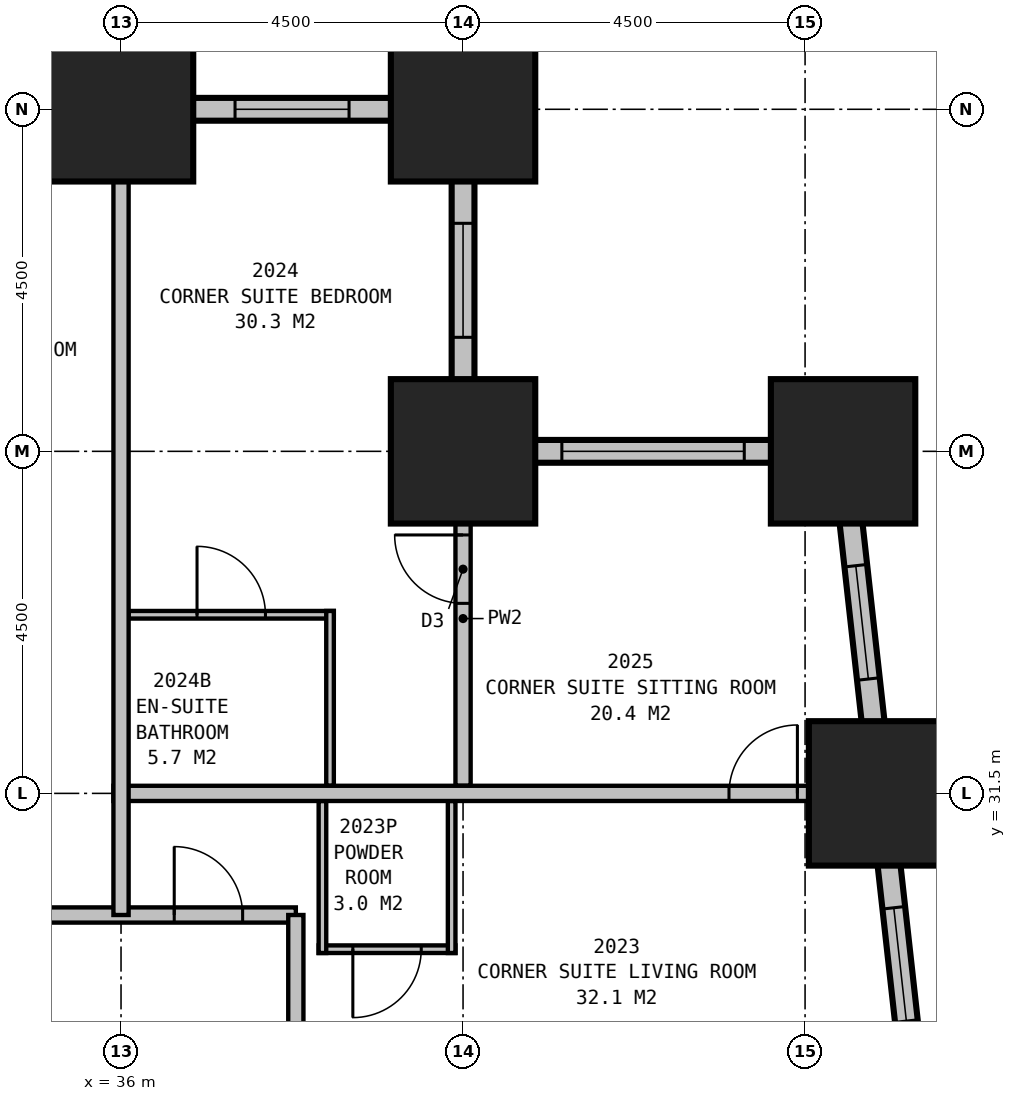
"""IFC4 building model, lengths in metres.
Left out: names, types, materials, properties, quantities, classifications, styles, units other than length and angle.
Written with IfcOpenShell. Run it as: python <this file> out.ifc"""

import sys

from ifc_helpers import new_model, si_unit, direction, frame, frame_2d, origin, origin_2d, place, context, subcontext, project, spatial, rectangle, extrude, element, fill, save


model = new_model("IFC4")
c1 = context("Model", 3, precision=1e-05, world=origin(), true_north=direction((0.0, 1.0)))
c2 = subcontext(c1, "Body", "Model", "MODEL_VIEW")
j1 = project(units=[si_unit("LENGTHUNIT", "METRE"), si_unit("PLANEANGLEUNIT", "RADIAN")], contexts=[c1])
p1 = place(None, origin())
s1 = spatial("IfcSite", under=j1, at=p1, CompositionType="ELEMENT")
p2 = place(p1, origin())
s2 = spatial("IfcBuilding", under=s1, at=p2, CompositionType="ELEMENT")
p3 = place(p2, frame((0.0, 0.0, 82.2)))
s3 = spatial("IfcBuildingStorey", under=s2, at=p3, CompositionType="ELEMENT", Elevation=82.2)
for number, where, z_axis, x_axis in (
    (1, (46.0, 31.5, 0.0), (0.0, 0.0, 1.0), (1.0, 0.0, 0.0)),
    (2, (45.5, 36.0, 0.0), (0.0, 0.0, 1.0), (1.0, 0.0, 0.0)),
    (3, (40.5, 36.0, 0.0), (0.0, 0.0, 1.0), (1.0, 0.0, 0.0)),
    (4, (40.5, 40.5, 0.0), (0.0, 0.0, 1.0), (1.0, 0.0, 0.0)),
    (5, (36.0, 40.5, 0.0), (0.0, 0.0, 1.0), (1.0, 0.0, 0.0)),
):
    element("IfcColumn", number, at=place(p3, frame(where, z_axis=z_axis, x_axis=x_axis)), inside=s3, PredefinedType="COLUMN", context=c2, shape_type="SweptSolid", body=[
        extrude(rectangle(XDim=1.9, YDim=1.9, at=origin_2d()), origin(), (0.0, 0.0, 1.0), 3.5),
    ])
p4 = place(p3, frame((49.017, 4.351, 0.0), z_axis=(0.0, 0.0, 1.0), x_axis=(-0.110433201132, 0.993883548555, 0.0)))
e6 = element("IfcWall", 6, at=p4, inside=s3, PredefinedType="STANDARD", context=c2, shape_type="SweptSolid", body=[
    extrude(rectangle(XDim=31.994, YDim=0.3, at=frame_2d((15.997, 0.0))), origin(), (0.0, 0.0, 1.0), 2.1),
])
p5 = place(p4, frame((1.664, 0.0, 0.5)))
e7 = element("IfcOpeningElement", 7, at=p5, cuts=e6, PredefinedType="OPENING", context=c2, shape_type="SweptSolid", body=[
    extrude(rectangle(XDim=1.5, YDim=1.4, at=frame_2d((0.75, 0.7))), frame((0.0, 0.16, 0.0), z_axis=(0.0, -1.0, 0.0), x_axis=(1.0, 0.0, 0.0)), (0.0, 0.0, 1.0), 0.32),
])
p6 = place(p4, frame((6.192, 0.0, 0.5)))
e8 = element("IfcOpeningElement", 8, at=p6, cuts=e6, PredefinedType="OPENING", context=c2, shape_type="SweptSolid", body=[
    extrude(rectangle(XDim=1.5, YDim=1.4, at=frame_2d((0.75, 0.7))), frame((0.0, 0.16, 0.0), z_axis=(0.0, -1.0, 0.0), x_axis=(1.0, 0.0, 0.0)), (0.0, 0.0, 1.0), 0.32),
])
p7 = place(p4, frame((10.719, 0.0, 0.5)))
e9 = element("IfcOpeningElement", 9, at=p7, cuts=e6, PredefinedType="OPENING", context=c2, shape_type="SweptSolid", body=[
    extrude(rectangle(XDim=1.5, YDim=1.4, at=frame_2d((0.75, 0.7))), frame((0.0, 0.16, 0.0), z_axis=(0.0, -1.0, 0.0), x_axis=(1.0, 0.0, 0.0)), (0.0, 0.0, 1.0), 0.32),
])
p8 = place(p4, frame((15.247, 0.0, 0.5)))
e10 = element("IfcOpeningElement", 10, at=p8, cuts=e6, PredefinedType="OPENING", context=c2, shape_type="SweptSolid", body=[
    extrude(rectangle(XDim=1.5, YDim=1.4, at=frame_2d((0.75, 0.7))), frame((0.0, 0.16, 0.0), z_axis=(0.0, -1.0, 0.0), x_axis=(1.0, 0.0, 0.0)), (0.0, 0.0, 1.0), 0.32),
])
p9 = place(p4, frame((19.775, 0.0, 0.5)))
e11 = element("IfcOpeningElement", 11, at=p9, cuts=e6, PredefinedType="OPENING", context=c2, shape_type="SweptSolid", body=[
    extrude(rectangle(XDim=1.5, YDim=1.4, at=frame_2d((0.75, 0.7))), frame((0.0, 0.16, 0.0), z_axis=(0.0, -1.0, 0.0), x_axis=(1.0, 0.0, 0.0)), (0.0, 0.0, 1.0), 0.32),
])
p10 = place(p4, frame((24.302, 0.0, 0.5)))
e12 = element("IfcOpeningElement", 12, at=p10, cuts=e6, PredefinedType="OPENING", context=c2, shape_type="SweptSolid", body=[
    extrude(rectangle(XDim=1.5, YDim=1.4, at=frame_2d((0.75, 0.7))), frame((0.0, 0.16, 0.0), z_axis=(0.0, -1.0, 0.0), x_axis=(1.0, 0.0, 0.0)), (0.0, 0.0, 1.0), 0.32),
])
p11 = place(p4, frame((28.83, 0.0, 0.5)))
e13 = element("IfcOpeningElement", 13, at=p11, cuts=e6, PredefinedType="OPENING", context=c2, shape_type="SweptSolid", body=[
    extrude(rectangle(XDim=1.5, YDim=1.4, at=frame_2d((0.75, 0.7))), frame((0.0, 0.16, 0.0), z_axis=(0.0, -1.0, 0.0), x_axis=(1.0, 0.0, 0.0)), (0.0, 0.0, 1.0), 0.32),
])
p12 = place(p3, frame((45.65, 36.0, 0.0), z_axis=(0.0, 0.0, 1.0), x_axis=(-1.0, 0.0, 0.0)))
e14 = element("IfcWall", 14, at=p12, inside=s3, PredefinedType="STANDARD", context=c2, shape_type="SweptSolid", body=[
    extrude(rectangle(XDim=5.3, YDim=0.3, at=frame_2d((2.65, 0.0))), origin(), (0.0, 0.0, 1.0), 2.1),
])
p13 = place(p12, frame((1.45, 0.0, 0.5)))
e15 = element("IfcOpeningElement", 15, at=p13, cuts=e14, PredefinedType="OPENING", context=c2, shape_type="SweptSolid", body=[
    extrude(rectangle(XDim=2.4, YDim=1.4, at=frame_2d((1.2, 0.7))), frame((0.0, 0.16, 0.0), z_axis=(0.0, -1.0, 0.0), x_axis=(1.0, 0.0, 0.0)), (0.0, 0.0, 1.0), 0.32),
])
p14 = place(p3, frame((40.5, 35.85, 0.0), z_axis=(0.0, 0.0, 1.0), x_axis=(0.0, 1.0, 0.0)))
e16 = element("IfcWall", 16, at=p14, inside=s3, PredefinedType="STANDARD", context=c2, shape_type="SweptSolid", body=[
    extrude(rectangle(XDim=4.8, YDim=0.3, at=frame_2d((2.4, 0.0))), origin(), (0.0, 0.0, 1.0), 2.1),
])
p15 = place(p14, frame((1.65, 0.0, 0.5)))
e17 = element("IfcOpeningElement", 17, at=p15, cuts=e16, PredefinedType="OPENING", context=c2, shape_type="SweptSolid", body=[
    extrude(rectangle(XDim=1.5, YDim=1.4, at=frame_2d((0.75, 0.7))), frame((0.0, 0.16, 0.0), z_axis=(0.0, -1.0, 0.0), x_axis=(1.0, 0.0, 0.0)), (0.0, 0.0, 1.0), 0.32),
])
p16 = place(p3, frame((40.65, 40.5, 0.0), z_axis=(0.0, 0.0, 1.0), x_axis=(-1.0, 0.0, 0.0)))
e18 = element("IfcWall", 18, at=p16, inside=s3, PredefinedType="STANDARD", context=c2, shape_type="SweptSolid", body=[
    extrude(rectangle(XDim=31.8, YDim=0.3, at=frame_2d((15.9, 0.0))), origin(), (0.0, 0.0, 1.0), 2.1),
])
p17 = place(p16, frame((1.65, 0.0, 0.5)))
e19 = element("IfcOpeningElement", 19, at=p17, cuts=e18, PredefinedType="OPENING", context=c2, shape_type="SweptSolid", body=[
    extrude(rectangle(XDim=1.5, YDim=1.4, at=frame_2d((0.75, 0.7))), frame((0.0, 0.16, 0.0), z_axis=(0.0, -1.0, 0.0), x_axis=(1.0, 0.0, 0.0)), (0.0, 0.0, 1.0), 0.32),
])
p18 = place(p16, frame((6.15, 0.0, 0.5)))
e20 = element("IfcOpeningElement", 20, at=p18, cuts=e18, PredefinedType="OPENING", context=c2, shape_type="SweptSolid", body=[
    extrude(rectangle(XDim=1.5, YDim=1.4, at=frame_2d((0.75, 0.7))), frame((0.0, 0.16, 0.0), z_axis=(0.0, -1.0, 0.0), x_axis=(1.0, 0.0, 0.0)), (0.0, 0.0, 1.0), 0.32),
])
p19 = place(p16, frame((10.65, 0.0, 0.5)))
e21 = element("IfcOpeningElement", 21, at=p19, cuts=e18, PredefinedType="OPENING", context=c2, shape_type="SweptSolid", body=[
    extrude(rectangle(XDim=1.5, YDim=1.4, at=frame_2d((0.75, 0.7))), frame((0.0, 0.16, 0.0), z_axis=(0.0, -1.0, 0.0), x_axis=(1.0, 0.0, 0.0)), (0.0, 0.0, 1.0), 0.32),
])
p20 = place(p16, frame((15.15, 0.0, 0.5)))
e22 = element("IfcOpeningElement", 22, at=p20, cuts=e18, PredefinedType="OPENING", context=c2, shape_type="SweptSolid", body=[
    extrude(rectangle(XDim=1.5, YDim=1.4, at=frame_2d((0.75, 0.7))), frame((0.0, 0.16, 0.0), z_axis=(0.0, -1.0, 0.0), x_axis=(1.0, 0.0, 0.0)), (0.0, 0.0, 1.0), 0.32),
])
p21 = place(p16, frame((19.65, 0.0, 0.5)))
e23 = element("IfcOpeningElement", 23, at=p21, cuts=e18, PredefinedType="OPENING", context=c2, shape_type="SweptSolid", body=[
    extrude(rectangle(XDim=1.5, YDim=1.4, at=frame_2d((0.75, 0.7))), frame((0.0, 0.16, 0.0), z_axis=(0.0, -1.0, 0.0), x_axis=(1.0, 0.0, 0.0)), (0.0, 0.0, 1.0), 0.32),
])
p22 = place(p16, frame((24.15, 0.0, 0.5)))
e24 = element("IfcOpeningElement", 24, at=p22, cuts=e18, PredefinedType="OPENING", context=c2, shape_type="SweptSolid", body=[
    extrude(rectangle(XDim=1.5, YDim=1.4, at=frame_2d((0.75, 0.7))), frame((0.0, 0.16, 0.0), z_axis=(0.0, -1.0, 0.0), x_axis=(1.0, 0.0, 0.0)), (0.0, 0.0, 1.0), 0.32),
])
p23 = place(p16, frame((28.65, 0.0, 0.5)))
e25 = element("IfcOpeningElement", 25, at=p23, cuts=e18, PredefinedType="OPENING", context=c2, shape_type="SweptSolid", body=[
    extrude(rectangle(XDim=1.5, YDim=1.4, at=frame_2d((0.75, 0.7))), frame((0.0, 0.16, 0.0), z_axis=(0.0, -1.0, 0.0), x_axis=(1.0, 0.0, 0.0)), (0.0, 0.0, 1.0), 0.32),
])
p24 = place(p3, frame((11.2, 29.9, 0.0), z_axis=(0.0, 0.0, 1.0), x_axis=(1.0, 0.0, 0.0)))
e26 = element("IfcWall", 26, at=p24, inside=s3, PredefinedType="PARTITIONING", context=c2, shape_type="SweptSolid", body=[
    extrude(rectangle(XDim=27.1, YDim=0.2, at=frame_2d((13.55, 0.0))), origin(), (0.0, 0.0, 1.0), 3.25),
])
p25 = place(p24, frame((5.05, 0.0, 0.0)))
e27 = element("IfcOpeningElement", 27, at=p25, cuts=e26, PredefinedType="OPENING", context=c2, shape_type="SweptSolid", body=[
    extrude(rectangle(XDim=0.9, YDim=2.1, at=frame_2d((0.45, 1.05))), frame((0.0, 0.11, 0.0), z_axis=(0.0, -1.0, 0.0), x_axis=(1.0, 0.0, 0.0)), (0.0, 0.0, 1.0), 0.22),
])
p26 = place(p24, frame((7.65, 0.0, 0.0)))
e28 = element("IfcOpeningElement", 28, at=p26, cuts=e26, PredefinedType="OPENING", context=c2, shape_type="SweptSolid", body=[
    extrude(rectangle(XDim=0.9, YDim=2.1, at=frame_2d((0.45, 1.05))), frame((0.0, 0.11, 0.0), z_axis=(0.0, -1.0, 0.0), x_axis=(1.0, 0.0, 0.0)), (0.0, 0.0, 1.0), 0.22),
])
p27 = place(p24, frame((12.0, 0.0, 0.0)))
e29 = element("IfcOpeningElement", 29, at=p27, cuts=e26, PredefinedType="OPENING", context=c2, shape_type="SweptSolid", body=[
    extrude(rectangle(XDim=1.0, YDim=2.1, at=frame_2d((0.5, 1.05))), frame((0.0, 0.11, 0.0), z_axis=(0.0, -1.0, 0.0), x_axis=(1.0, 0.0, 0.0)), (0.0, 0.0, 1.0), 0.22),
])
p28 = place(p24, frame((17.45, 0.0, 0.0)))
e30 = element("IfcOpeningElement", 30, at=p28, cuts=e26, PredefinedType="OPENING", context=c2, shape_type="SweptSolid", body=[
    extrude(rectangle(XDim=0.9, YDim=2.1, at=frame_2d((0.45, 1.05))), frame((0.0, 0.11, 0.0), z_axis=(0.0, -1.0, 0.0), x_axis=(1.0, 0.0, 0.0)), (0.0, 0.0, 1.0), 0.22),
])
p29 = place(p24, frame((21.8, 0.0, 0.0)))
e31 = element("IfcOpeningElement", 31, at=p29, cuts=e26, PredefinedType="OPENING", context=c2, shape_type="SweptSolid", body=[
    extrude(rectangle(XDim=0.9, YDim=2.1, at=frame_2d((0.45, 1.05))), frame((0.0, 0.11, 0.0), z_axis=(0.0, -1.0, 0.0), x_axis=(1.0, 0.0, 0.0)), (0.0, 0.0, 1.0), 0.22),
])
p30 = place(p24, frame((25.5, 0.0, 0.0)))
e32 = element("IfcOpeningElement", 32, at=p30, cuts=e26, PredefinedType="OPENING", context=c2, shape_type="SweptSolid", body=[
    extrude(rectangle(XDim=0.9, YDim=2.1, at=frame_2d((0.45, 1.05))), frame((0.0, 0.11, 0.0), z_axis=(0.0, -1.0, 0.0), x_axis=(1.0, 0.0, 0.0)), (0.0, 0.0, 1.0), 0.22),
])
p31 = place(p24, frame((0.7, 0.0, 0.0)))
e33 = element("IfcOpeningElement", 33, at=p31, cuts=e26, PredefinedType="OPENING", context=c2, shape_type="SweptSolid", body=[
    extrude(rectangle(XDim=0.9, YDim=2.1, at=frame_2d((0.45, 1.05))), frame((0.0, 0.11, 0.0), z_axis=(0.0, -1.0, 0.0), x_axis=(1.0, 0.0, 0.0)), (0.0, 0.0, 1.0), 0.22),
])
p32 = place(p3, frame((38.3, 11.2, 0.0), z_axis=(0.0, 0.0, 1.0), x_axis=(0.0, 1.0, 0.0)))
e34 = element("IfcWall", 34, at=p32, inside=s3, PredefinedType="PARTITIONING", context=c2, shape_type="SweptSolid", body=[
    extrude(rectangle(XDim=18.7, YDim=0.2, at=frame_2d((9.35, 0.0))), origin(), (0.0, 0.0, 1.0), 3.25),
])
p33 = place(p32, frame((6.45, 0.0, 0.0), z_axis=(0.0, 0.0, 1.0), x_axis=(-1.0, 0.0, 0.0)))
e35 = element("IfcOpeningElement", 35, at=p33, cuts=e34, PredefinedType="OPENING", context=c2, shape_type="SweptSolid", body=[
    extrude(rectangle(XDim=1.0, YDim=2.1, at=frame_2d((0.5, 1.05))), frame((0.0, 0.11, 0.0), z_axis=(0.0, -1.0, 0.0), x_axis=(1.0, 0.0, 0.0)), (0.0, 0.0, 1.0), 0.22),
])
p34 = place(p32, frame((8.0, 0.0, 0.0), z_axis=(0.0, 0.0, 1.0), x_axis=(-1.0, 0.0, 0.0)))
e36 = element("IfcOpeningElement", 36, at=p34, cuts=e34, PredefinedType="OPENING", context=c2, shape_type="SweptSolid", body=[
    extrude(rectangle(XDim=0.9, YDim=2.1, at=frame_2d((0.45, 1.05))), frame((0.0, 0.11, 0.0), z_axis=(0.0, -1.0, 0.0), x_axis=(1.0, 0.0, 0.0)), (0.0, 0.0, 1.0), 0.22),
])
p35 = place(p3, frame((36.0, 29.9, 0.0), z_axis=(0.0, 0.0, 1.0), x_axis=(0.0, 1.0, 0.0)))
e37 = element("IfcWall", 37, at=p35, inside=s3, PredefinedType="PARTITIONING", context=c2, shape_type="SweptSolid", body=[
    extrude(rectangle(XDim=10.6, YDim=0.2, at=frame_2d((5.3, 0.0))), origin(), (0.0, 0.0, 1.0), 2.2),
])
p36 = place(p3, frame((35.9, 31.5, 0.0), z_axis=(0.0, 0.0, 1.0), x_axis=(1.0, 0.0, 0.0)))
e38 = element("IfcWall", 38, at=p36, inside=s3, PredefinedType="PARTITIONING", context=c2, shape_type="SweptSolid", body=[
    extrude(rectangle(XDim=10.099, YDim=0.2, at=frame_2d((5.05, 0.0))), origin(), (0.0, 0.0, 1.0), 3.25),
])
p37 = place(p36, frame((8.099, 0.0, 0.0)))
e39 = element("IfcOpeningElement", 39, at=p37, cuts=e38, PredefinedType="OPENING", context=c2, shape_type="SweptSolid", body=[
    extrude(rectangle(XDim=0.9, YDim=2.1, at=frame_2d((0.45, 1.05))), frame((0.0, 0.11, 0.0), z_axis=(0.0, -1.0, 0.0), x_axis=(1.0, 0.0, 0.0)), (0.0, 0.0, 1.0), 0.22),
])
p38 = place(p3, frame((40.35, 31.4, 0.0), z_axis=(0.0, 0.0, 1.0), x_axis=(0.0, -1.0, 0.0)))
e40 = element("IfcWall", 40, at=p38, inside=s3, PredefinedType="PLUMBINGWALL", context=c2, shape_type="SweptSolid", body=[
    extrude(rectangle(XDim=2.0, YDim=0.1, at=frame_2d((1.0, 0.0))), origin(), (0.0, 0.0, 1.0), 2.2),
])
p39 = place(p3, frame((38.65, 31.4, 0.0), z_axis=(0.0, 0.0, 1.0), x_axis=(0.0, -1.0, 0.0)))
e41 = element("IfcWall", 41, at=p39, inside=s3, PredefinedType="PLUMBINGWALL", context=c2, shape_type="SweptSolid", body=[
    extrude(rectangle(XDim=2.0, YDim=0.1, at=frame_2d((1.0, 0.0))), origin(), (0.0, 0.0, 1.0), 3.25),
])
p40 = place(p3, frame((38.6, 29.45, 0.0), z_axis=(0.0, 0.0, 1.0), x_axis=(1.0, 0.0, 0.0)))
e42 = element("IfcWall", 42, at=p40, inside=s3, PredefinedType="PLUMBINGWALL", context=c2, shape_type="SweptSolid", body=[
    extrude(rectangle(XDim=1.8, YDim=0.1, at=frame_2d((0.9, 0.0))), origin(), (0.0, 0.0, 1.0), 3.25),
])
p41 = place(p40, frame((1.35, 0.0, 0.0), z_axis=(0.0, 0.0, 1.0), x_axis=(-1.0, 0.0, 0.0)))
e43 = element("IfcOpeningElement", 43, at=p41, cuts=e42, PredefinedType="OPENING", context=c2, shape_type="SweptSolid", body=[
    extrude(rectangle(XDim=0.9, YDim=2.1, at=frame_2d((0.45, 1.05))), frame((0.0, 0.06, 0.0), z_axis=(0.0, -1.0, 0.0), x_axis=(1.0, 0.0, 0.0)), (0.0, 0.0, 1.0), 0.12),
])
p42 = place(p3, frame((40.5, 31.6, 0.0), z_axis=(0.0, 0.0, 1.0), x_axis=(0.0, 1.0, 0.0)))
e44 = element("IfcWall", 44, at=p42, inside=s3, PredefinedType="PARTITIONING", context=c2, shape_type="SweptSolid", body=[
    extrude(rectangle(XDim=4.4, YDim=0.2, at=frame_2d((2.2, 0.0))), origin(), (0.0, 0.0, 1.0), 2.2),
])
p43 = place(p42, frame((2.4, 0.0, 0.0)))
e45 = element("IfcOpeningElement", 45, at=p43, cuts=e44, PredefinedType="OPENING", context=c2, shape_type="SweptSolid", body=[
    extrude(rectangle(XDim=0.9, YDim=2.1, at=frame_2d((0.45, 1.05))), frame((0.0, 0.11, 0.0), z_axis=(0.0, -1.0, 0.0), x_axis=(1.0, 0.0, 0.0)), (0.0, 0.0, 1.0), 0.22),
])
p44 = place(p3, frame((38.75, 31.6, 0.0), z_axis=(0.0, 0.0, 1.0), x_axis=(0.0, 1.0, 0.0)))
e46 = element("IfcWall", 46, at=p44, inside=s3, PredefinedType="PLUMBINGWALL", context=c2, shape_type="SweptSolid", body=[
    extrude(rectangle(XDim=2.3, YDim=0.1, at=frame_2d((1.15, 0.0))), origin(), (0.0, 0.0, 1.0), 3.25),
])
p45 = place(p3, frame((36.1, 33.85, 0.0), z_axis=(0.0, 0.0, 1.0), x_axis=(1.0, 0.0, 0.0)))
e47 = element("IfcWall", 47, at=p45, inside=s3, PredefinedType="PLUMBINGWALL", context=c2, shape_type="SweptSolid", body=[
    extrude(rectangle(XDim=2.7, YDim=0.1, at=frame_2d((1.35, 0.0))), origin(), (0.0, 0.0, 1.0), 3.25),
])
p46 = place(p45, frame((0.9, 0.0, 0.0)))
e48 = element("IfcOpeningElement", 48, at=p46, cuts=e47, PredefinedType="OPENING", context=c2, shape_type="SweptSolid", body=[
    extrude(rectangle(XDim=0.9, YDim=2.1, at=frame_2d((0.45, 1.05))), frame((0.0, 0.06, 0.0), z_axis=(0.0, -1.0, 0.0), x_axis=(1.0, 0.0, 0.0)), (0.0, 0.0, 1.0), 0.12),
])
p47 = place(p10, origin())
e49 = element("IfcWindow", 49, at=p47, inside=s3, PartitioningType="SINGLE_PANEL", PredefinedType="WINDOW", context=c2, shape_type="SweptSolid", body=[
    extrude(rectangle(XDim=1.5, YDim=1.4, at=frame_2d((0.75, 0.7))), frame((0.0, 0.03, 0.0), z_axis=(0.0, -1.0, 0.0), x_axis=(1.0, 0.0, 0.0)), (0.0, 0.0, 1.0), 0.06),
])
fill(e12, e49)
p48 = place(p11, origin())
e50 = element("IfcWindow", 50, at=p48, inside=s3, PartitioningType="SINGLE_PANEL", PredefinedType="WINDOW", context=c2, shape_type="SweptSolid", body=[
    extrude(rectangle(XDim=1.5, YDim=1.4, at=frame_2d((0.75, 0.7))), frame((0.0, 0.03, 0.0), z_axis=(0.0, -1.0, 0.0), x_axis=(1.0, 0.0, 0.0)), (0.0, 0.0, 1.0), 0.06),
])
fill(e13, e50)
p49 = place(p13, origin())
e51 = element("IfcWindow", 51, at=p49, inside=s3, PartitioningType="SINGLE_PANEL", PredefinedType="WINDOW", context=c2, shape_type="SweptSolid", body=[
    extrude(rectangle(XDim=2.4, YDim=1.4, at=frame_2d((1.2, 0.7))), frame((0.0, 0.03, 0.0), z_axis=(0.0, -1.0, 0.0), x_axis=(1.0, 0.0, 0.0)), (0.0, 0.0, 1.0), 0.06),
])
fill(e15, e51)
p50 = place(p15, origin())
e52 = element("IfcWindow", 52, at=p50, inside=s3, PartitioningType="SINGLE_PANEL", PredefinedType="WINDOW", context=c2, shape_type="SweptSolid", body=[
    extrude(rectangle(XDim=1.5, YDim=1.4, at=frame_2d((0.75, 0.7))), frame((0.0, 0.03, 0.0), z_axis=(0.0, -1.0, 0.0), x_axis=(1.0, 0.0, 0.0)), (0.0, 0.0, 1.0), 0.06),
])
fill(e17, e52)
p51 = place(p17, origin())
e53 = element("IfcWindow", 53, at=p51, inside=s3, PartitioningType="SINGLE_PANEL", PredefinedType="WINDOW", context=c2, shape_type="SweptSolid", body=[
    extrude(rectangle(XDim=1.5, YDim=1.4, at=frame_2d((0.75, 0.7))), frame((0.0, 0.03, 0.0), z_axis=(0.0, -1.0, 0.0), x_axis=(1.0, 0.0, 0.0)), (0.0, 0.0, 1.0), 0.06),
])
fill(e19, e53)
p52 = place(p30, origin())
e54 = element("IfcDoor", 54, at=p52, inside=s3, OperationType="SINGLE_SWING_LEFT", PredefinedType="DOOR", context=c2, shape_type="SweptSolid", body=[
    extrude(rectangle(XDim=0.9, YDim=2.1, at=frame_2d((0.45, 1.05))), frame((0.0, 0.025, 0.0), z_axis=(0.0, -1.0, 0.0), x_axis=(1.0, 0.0, 0.0)), (0.0, 0.0, 1.0), 0.05),
])
fill(e32, e54)
p53 = place(p37, origin())
e55 = element("IfcDoor", 55, at=p53, inside=s3, OperationType="SINGLE_SWING_RIGHT", PredefinedType="DOOR", context=c2, shape_type="SweptSolid", body=[
    extrude(rectangle(XDim=0.9, YDim=2.1, at=frame_2d((0.45, 1.05))), frame((0.0, 0.025, 0.0), z_axis=(0.0, -1.0, 0.0), x_axis=(1.0, 0.0, 0.0)), (0.0, 0.0, 1.0), 0.05),
])
fill(e39, e55)
p54 = place(p41, origin())
e56 = element("IfcDoor", 56, at=p54, inside=s3, OperationType="SINGLE_SWING_RIGHT", PredefinedType="DOOR", context=c2, shape_type="SweptSolid", body=[
    extrude(rectangle(XDim=0.9, YDim=2.1, at=frame_2d((0.45, 1.05))), frame((0.0, 0.025, 0.0), z_axis=(0.0, -1.0, 0.0), x_axis=(1.0, 0.0, 0.0)), (0.0, 0.0, 1.0), 0.05),
])
fill(e43, e56)
p55 = place(p43, origin())
e57 = element("IfcDoor", 57, at=p55, inside=s3, OperationType="SINGLE_SWING_RIGHT", PredefinedType="DOOR", context=c2, shape_type="SweptSolid", body=[
    extrude(rectangle(XDim=0.9, YDim=2.1, at=frame_2d((0.45, 1.05))), frame((0.0, 0.025, 0.0), z_axis=(0.0, -1.0, 0.0), x_axis=(1.0, 0.0, 0.0)), (0.0, 0.0, 1.0), 0.05),
])
fill(e45, e57)
p56 = place(p46, origin())
e58 = element("IfcDoor", 58, at=p56, inside=s3, OperationType="SINGLE_SWING_LEFT", PredefinedType="DOOR", context=c2, shape_type="SweptSolid", body=[
    extrude(rectangle(XDim=0.9, YDim=2.1, at=frame_2d((0.45, 1.05))), frame((0.0, 0.025, 0.0), z_axis=(0.0, -1.0, 0.0), x_axis=(1.0, 0.0, 0.0)), (0.0, 0.0, 1.0), 0.05),
])
fill(e48, e58)
save(model, sys.argv[1])
